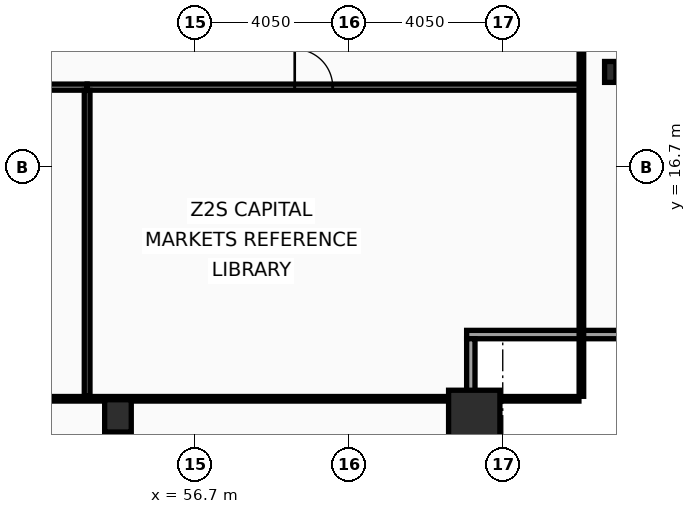
"""IFC4 building model, lengths in metres.
Left out: names, types, materials, properties, quantities, classifications, styles, units other than length and angle.
Written with IfcOpenShell. Run it as: python <this file> out.ifc"""

import sys

from ifc_helpers import new_model, si_unit, direction, frame, frame_2d, origin, origin_2d, place, context, subcontext, project, spatial, rectangle, hollow_rectangle, i_section, extrude, element, fill, save


model = new_model("IFC4")
c1 = context("Model", 3, precision=1e-05, world=origin(), true_north=direction((0.0, 1.0)))
c2 = subcontext(c1, "Body", "Model", "MODEL_VIEW")
j1 = project(units=[si_unit("LENGTHUNIT", "METRE"), si_unit("PLANEANGLEUNIT", "RADIAN")], contexts=[c1])
p1 = place(None, origin())
s1 = spatial("IfcSite", under=j1, at=p1, CompositionType="ELEMENT")
p2 = place(p1, origin())
s2 = spatial("IfcBuilding", under=s1, at=p2, CompositionType="ELEMENT")
p3 = place(p2, frame((0.0, 0.0, 150.6)))
s3 = spatial("IfcBuildingStorey", under=s2, at=p3, CompositionType="ELEMENT", Elevation=150.6)
p4 = place(p3, frame((64.05, 10.15, 0.0), z_axis=(0.0, 0.0, 1.0), x_axis=(1.0, 0.0, 0.0)))
e1 = element("IfcColumn", 1, at=p4, inside=s3, PredefinedType="COLUMN", context=c2, shape_type="SweptSolid", body=[
    extrude(hollow_rectangle(XDim=1.35, YDim=1.35, WallThickness=0.065, at=origin_2d()), origin(), (0.0, 0.0, 1.0), 3.6),
])
p5 = place(p3, frame((54.675, 10.15, 0.0), z_axis=(0.0, 0.0, 1.0), x_axis=(1.0, 0.0, 0.0)))
e2 = element("IfcColumn", 2, at=p5, inside=s3, PredefinedType="COLUMN", context=c2, shape_type="SweptSolid", body=[
    extrude(hollow_rectangle(XDim=0.7, YDim=0.85, WallThickness=0.05, at=origin_2d()), origin(), (0.0, 0.0, 1.0), 3.6),
])
p6 = place(p3, frame((67.63, 19.2, 0.0), z_axis=(0.0, 0.0, 1.0), x_axis=(1.0, 0.0, 0.0)))
e3 = element("IfcColumn", 3, at=p6, inside=s3, PredefinedType="COLUMN", context=c2, shape_type="SweptSolid", body=[
    extrude(i_section(OverallWidth=0.3, OverallDepth=0.55, WebThickness=0.015, FlangeThickness=0.029, at=origin_2d()), origin(), (0.0, 0.0, 1.0), 3.6),
])
p7 = place(p3, frame((68.07, 12.29, 0.0), z_axis=(0.0, 0.0, 1.0), x_axis=(-1.0, 0.0, 0.0)))
e4 = element("IfcWall", 4, at=p7, inside=s3, PredefinedType="SOLIDWALL", context=c2, shape_type="SweptSolid", body=[
    extrude(rectangle(XDim=4.22, YDim=0.22, at=frame_2d((2.11, 0.0))), origin(), (0.0, 0.0, 1.0), 2.83),
])
p8 = place(p3, frame((63.96, 12.18, 0.0), z_axis=(0.0, 0.0, 1.0), x_axis=(0.0, -1.0, 0.0)))
e5 = element("IfcWall", 5, at=p8, inside=s3, PredefinedType="SOLIDWALL", context=c2, shape_type="SweptSolid", body=[
    extrude(rectangle(XDim=3.91, YDim=0.22, at=frame_2d((1.955, 0.0))), origin(), (0.0, 0.0, 1.0), 2.83),
])
p9 = place(p3, frame((40.832, 18.8, 0.0), z_axis=(0.0, 0.0, 1.0), x_axis=(1.0, 0.0, 0.0)))
e6 = element("IfcWall", 6, at=p9, inside=s3, PredefinedType="PARTITIONING", context=c2, shape_type="SweptSolid", body=[
    extrude(rectangle(XDim=13.032, YDim=0.16, at=frame_2d((6.516, 0.0))), origin(), (0.0, 0.0, 1.0), 2.73),
])
p10 = place(p9, frame((5.473, 0.0, 0.0)))
e7 = element("IfcOpeningElement", 7, at=p10, cuts=e6, PredefinedType="OPENING", context=c2, shape_type="SweptSolid", body=[
    extrude(rectangle(XDim=1.0, YDim=2.05, at=frame_2d((0.5, 1.025))), frame((0.0, 0.09, 0.0), z_axis=(0.0, -1.0, 0.0), x_axis=(1.0, 0.0, 0.0)), (0.0, 0.0, 1.0), 0.18),
])
p11 = place(p3, frame((53.864, 18.8, 0.0), z_axis=(0.0, 0.0, 1.0), x_axis=(1.0, 0.0, 0.0)))
e8 = element("IfcWall", 8, at=p11, inside=s3, PredefinedType="PARTITIONING", context=c2, shape_type="SweptSolid", body=[
    extrude(rectangle(XDim=13.006, YDim=0.16, at=frame_2d((6.503, 0.0))), origin(), (0.0, 0.0, 1.0), 2.73),
])
p12 = place(p11, frame((5.463, 0.0, 0.0)))
e9 = element("IfcOpeningElement", 9, at=p12, cuts=e8, PredefinedType="OPENING", context=c2, shape_type="SweptSolid", body=[
    extrude(rectangle(XDim=1.0, YDim=2.05, at=frame_2d((0.5, 1.025))), frame((0.0, 0.09, 0.0), z_axis=(0.0, -1.0, 0.0), x_axis=(1.0, 0.0, 0.0)), (0.0, 0.0, 1.0), 0.18),
])
p13 = place(p3, frame((53.864, 10.665, 0.0), z_axis=(0.0, 0.0, 1.0), x_axis=(0.0, 1.0, 0.0)))
e10 = element("IfcWall", 10, at=p13, inside=s3, PredefinedType="PARTITIONING", context=c2, shape_type="SweptSolid", body=[
    extrude(rectangle(XDim=8.05, YDim=0.15, at=frame_2d((4.025, 0.0))), origin(), (0.0, 0.0, 1.0), 2.93),
])
p14 = place(p3, frame((66.87, 10.665, 0.0), z_axis=(0.0, 0.0, 1.0), x_axis=(0.0, 1.0, 0.0)))
e11 = element("IfcWall", 11, at=p14, inside=s3, PredefinedType="PARTITIONING", context=c2, shape_type="SweptSolid", body=[
    extrude(rectangle(XDim=42.11, YDim=0.12, at=frame_2d((21.055, 0.0))), origin(), (0.0, 0.0, 1.0), 2.73),
])
p15 = place(p3, frame((6.095, 10.6, 0.0), z_axis=(0.0, 0.0, 1.0), x_axis=(1.0, 0.0, 0.0)))
e12 = element("IfcWall", 12, at=p15, inside=s3, PredefinedType="PARTITIONING", context=c2, shape_type="SweptSolid", body=[
    extrude(rectangle(XDim=60.71, YDim=0.12, at=frame_2d((30.355, 0.0))), origin(), (0.0, 0.0, 1.0), 2.73),
])
p16 = place(p12, origin())
e13 = element("IfcDoor", 13, at=p16, inside=s3, OperationType="SINGLE_SWING_LEFT", PredefinedType="DOOR", context=c2, shape_type="SweptSolid", body=[
    extrude(rectangle(XDim=1.0, YDim=2.05, at=frame_2d((0.5, 1.025))), frame((0.0, 0.025, 0.0), z_axis=(0.0, -1.0, 0.0), x_axis=(1.0, 0.0, 0.0)), (0.0, 0.0, 1.0), 0.05),
])
fill(e9, e13)
save(model, sys.argv[1])
